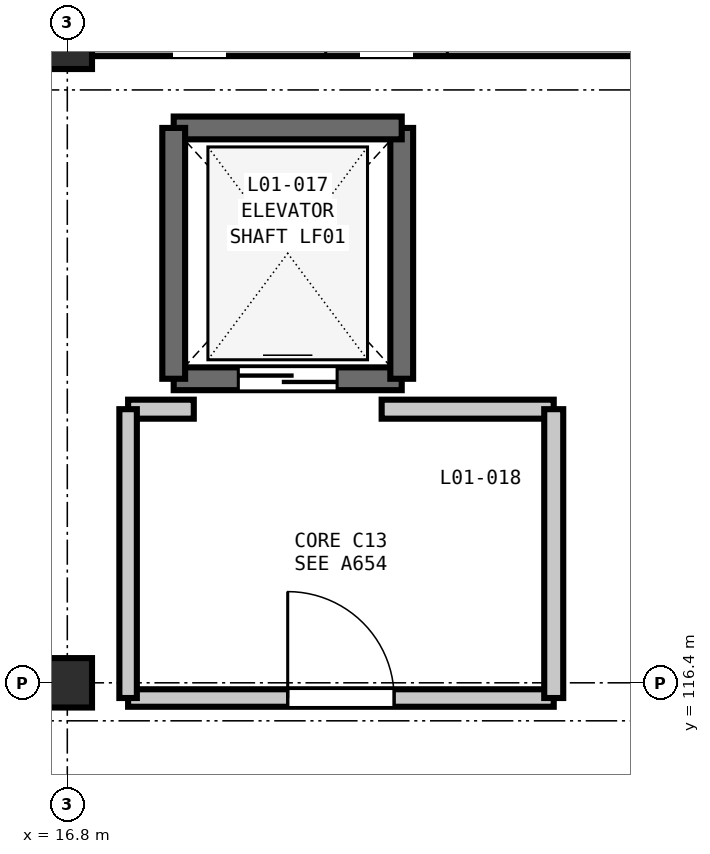
"""IFC4 building model, lengths in metres.
Left out: names, types, materials, properties, quantities, classifications, styles, units other than length and angle.
Written with IfcOpenShell. Run it as: python <this file> out.ifc"""

import sys

from ifc_helpers import new_model, si_unit, direction, frame, frame_2d, origin, origin_2d, place, context, subcontext, project, spatial, rectangle, extrude, element, fill, save


model = new_model("IFC4")
c1 = context("Model", 3, precision=1e-05, world=origin(), true_north=direction((0.0, 1.0)))
c2 = subcontext(c1, "Body", "Model", "MODEL_VIEW")
j1 = project(units=[si_unit("LENGTHUNIT", "METRE"), si_unit("PLANEANGLEUNIT", "RADIAN")], contexts=[c1])
p1 = place(None, origin())
s1 = spatial("IfcSite", under=j1, at=p1, CompositionType="ELEMENT")
p2 = place(p1, origin())
s2 = spatial("IfcBuilding", under=s1, at=p2, CompositionType="ELEMENT")
p3 = place(p2, frame((0.0, 0.0, 5.4)))
s3 = spatial("IfcBuildingStorey", under=s2, at=p3, CompositionType="ELEMENT", Elevation=5.4)
for number, where, z_axis, x_axis in (
    (1, (16.8, 116.4, 0.0), (0.0, 0.0, 1.0), (1.0, 0.0, 0.0)),
    (2, (16.8, 124.8, 0.0), (0.0, 0.0, 1.0), (1.0, 0.0, 0.0)),
):
    element("IfcColumn", number, at=place(p3, frame(where, z_axis=z_axis, x_axis=x_axis)), inside=s3, PredefinedType="COLUMN", context=c2, shape_type="SweptSolid", body=[
        extrude(rectangle(XDim=0.65, YDim=0.65, at=origin_2d()), origin(), (0.0, 0.0, 1.0), 5.4),
    ])
p4 = place(p3, frame((17.123, 124.8, 0.0), z_axis=(0.0, 0.0, 1.0), x_axis=(1.0, 0.0, 0.0)))
e3 = element("IfcWall", 3, at=p4, inside=s3, PredefinedType="SOLIDWALL", context=c2, shape_type="SweptSolid", body=[
    extrude(rectangle(XDim=7.754, YDim=0.31, at=frame_2d((3.877, 0.0))), origin(), (0.0, 0.0, 1.0), 4.68),
])
p5 = place(p4, frame((3.077, 0.0, 0.9)))
e4 = element("IfcOpeningElement", 4, at=p5, cuts=e3, PredefinedType="OPENING", context=c2, shape_type="SweptSolid", body=[
    extrude(rectangle(XDim=1.6, YDim=1.75, at=frame_2d((0.8, 0.875))), frame((0.0, 0.165, 0.0), z_axis=(0.0, -1.0, 0.0), x_axis=(1.0, 0.0, 0.0)), (0.0, 0.0, 1.0), 0.33),
])
p6 = place(p3, frame((18.2, 120.4, 0.0), z_axis=(0.0, 0.0, 1.0), x_axis=(1.0, 0.0, 0.0)))
e5 = element("IfcWall", 5, at=p6, inside=s3, PredefinedType="SHEAR", context=c2, shape_type="SweptSolid", body=[
    extrude(rectangle(XDim=3.0, YDim=0.3, at=frame_2d((1.5, 0.0))), origin(), (0.0, 0.0, 1.0), 5.4),
])
p7 = place(p6, frame((0.85, 0.0, 0.0)))
e6 = element("IfcOpeningElement", 6, at=p7, cuts=e5, PredefinedType="OPENING", context=c2, shape_type="SweptSolid", body=[
    extrude(rectangle(XDim=1.3, YDim=2.2, at=frame_2d((0.65, 1.1))), frame((0.0, 0.16, 0.0), z_axis=(0.0, -1.0, 0.0), x_axis=(1.0, 0.0, 0.0)), (0.0, 0.0, 1.0), 0.32),
])
p8 = place(p3, frame((21.2, 120.4, 0.0), z_axis=(0.0, 0.0, 1.0), x_axis=(0.0, 1.0, 0.0)))
e7 = element("IfcWall", 7, at=p8, inside=s3, PredefinedType="SHEAR", context=c2, shape_type="SweptSolid", body=[
    extrude(rectangle(XDim=3.3, YDim=0.3, at=frame_2d((1.65, 0.0))), origin(), (0.0, 0.0, 1.0), 5.4),
])
p9 = place(p3, frame((21.2, 123.7, 0.0), z_axis=(0.0, 0.0, 1.0), x_axis=(-1.0, 0.0, 0.0)))
e8 = element("IfcWall", 8, at=p9, inside=s3, PredefinedType="SHEAR", context=c2, shape_type="SweptSolid", body=[
    extrude(rectangle(XDim=3.0, YDim=0.3, at=frame_2d((1.5, 0.0))), origin(), (0.0, 0.0, 1.0), 5.4),
])
p10 = place(p3, frame((18.2, 123.7, 0.0), z_axis=(0.0, 0.0, 1.0), x_axis=(0.0, -1.0, 0.0)))
e9 = element("IfcWall", 9, at=p10, inside=s3, PredefinedType="SHEAR", context=c2, shape_type="SweptSolid", body=[
    extrude(rectangle(XDim=3.3, YDim=0.3, at=frame_2d((1.65, 0.0))), origin(), (0.0, 0.0, 1.0), 5.4),
])
p11 = place(p3, frame((17.6, 116.2, 0.0), z_axis=(0.0, 0.0, 1.0), x_axis=(1.0, 0.0, 0.0)))
e10 = element("IfcWall", 10, at=p11, inside=s3, PredefinedType="PARTITIONING", context=c2, shape_type="SweptSolid", body=[
    extrude(rectangle(XDim=5.6, YDim=0.23, at=frame_2d((2.8, 0.0))), origin(), (0.0, 0.0, 1.0), 4.685),
])
p12 = place(p11, frame((2.1, 0.0, 0.0)))
e11 = element("IfcOpeningElement", 11, at=p12, cuts=e10, PredefinedType="OPENING", context=c2, shape_type="SweptSolid", body=[
    extrude(rectangle(XDim=1.4, YDim=2.2, at=frame_2d((0.7, 1.1))), frame((0.0, 0.125, 0.0), z_axis=(0.0, -1.0, 0.0), x_axis=(1.0, 0.0, 0.0)), (0.0, 0.0, 1.0), 0.25),
])
p13 = place(p3, frame((20.936, 120.0, 0.0), z_axis=(0.0, 0.0, 1.0), x_axis=(1.0, 0.0, 0.0)))
e12 = element("IfcWall", 12, at=p13, inside=s3, PredefinedType="PARTITIONING", context=c2, shape_type="SweptSolid", body=[
    extrude(rectangle(XDim=2.264, YDim=0.25, at=frame_2d((1.132, 0.0))), origin(), (0.0, 0.0, 1.0), 5.05),
])
p14 = place(p3, frame((17.6, 120.0, 0.0), z_axis=(0.0, 0.0, 1.0), x_axis=(1.0, 0.0, 0.0)))
e13 = element("IfcWall", 13, at=p14, inside=s3, PredefinedType="PARTITIONING", context=c2, shape_type="SweptSolid", body=[
    extrude(rectangle(XDim=0.864, YDim=0.25, at=frame_2d((0.432, 0.0))), origin(), (0.0, 0.0, 1.0), 5.05),
])
p15 = place(p3, frame((17.6, 116.2, 0.0), z_axis=(0.0, 0.0, 1.0), x_axis=(0.0, 1.0, 0.0)))
e14 = element("IfcWall", 14, at=p15, inside=s3, PredefinedType="PARTITIONING", context=c2, shape_type="SweptSolid", body=[
    extrude(rectangle(XDim=3.8, YDim=0.23, at=frame_2d((1.9, 0.0))), origin(), (0.0, 0.0, 1.0), 5.05),
])
p16 = place(p3, frame((23.2, 116.2, 0.0), z_axis=(0.0, 0.0, 1.0), x_axis=(0.0, 1.0, 0.0)))
e15 = element("IfcWall", 15, at=p16, inside=s3, PredefinedType="PARTITIONING", context=c2, shape_type="SweptSolid", body=[
    extrude(rectangle(XDim=3.8, YDim=0.25, at=frame_2d((1.9, 0.0))), origin(), (0.0, 0.0, 1.0), 5.05),
])
p17 = place(p7, origin())
e16 = element("IfcDoor", 16, at=p17, inside=s3, OperationType="DOUBLE_DOOR_SLIDING", PredefinedType="DOOR", context=c2, shape_type="SweptSolid", body=[
    extrude(rectangle(XDim=1.3, YDim=2.2, at=frame_2d((0.65, 1.1))), frame((0.0, 0.025, 0.0), z_axis=(0.0, -1.0, 0.0), x_axis=(1.0, 0.0, 0.0)), (0.0, 0.0, 1.0), 0.05),
])
fill(e6, e16)
p18 = place(p12, origin())
e17 = element("IfcDoor", 17, at=p18, inside=s3, OperationType="SINGLE_SWING_LEFT", PredefinedType="DOOR", context=c2, shape_type="SweptSolid", body=[
    extrude(rectangle(XDim=1.4, YDim=2.2, at=frame_2d((0.7, 1.1))), frame((0.0, 0.025, 0.0), z_axis=(0.0, -1.0, 0.0), x_axis=(1.0, 0.0, 0.0)), (0.0, 0.0, 1.0), 0.05),
])
fill(e11, e17)
save(model, sys.argv[1])
